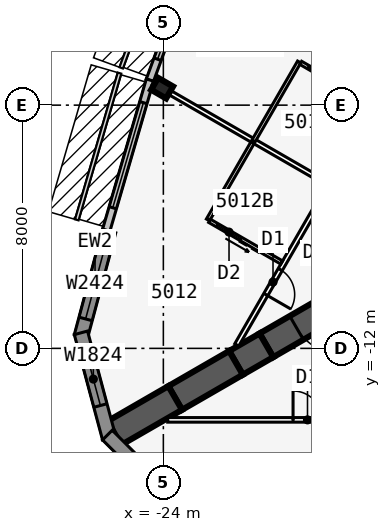
"""IFC4 building model, lengths in metres.
Left out: names, types, materials, properties, quantities, classifications, styles, units other than length and angle.
Written with IfcOpenShell. Run it as: python <this file> out.ifc"""

import sys

from ifc_helpers import new_model, si_unit, direction, frame, frame_2d, origin, origin_2d, place, context, subcontext, project, spatial, polyline, rectangle, i_section, outline, extrude, element, fill, save


model = new_model("IFC4")
c1 = context("Model", 3, precision=1e-05, world=origin(), true_north=direction((0.0, 1.0)))
c2 = subcontext(c1, "Body", "Model", "MODEL_VIEW")
j1 = project(units=[si_unit("LENGTHUNIT", "METRE"), si_unit("PLANEANGLEUNIT", "RADIAN")], contexts=[c1])
p1 = place(None, origin())
s1 = spatial("IfcSite", under=j1, at=p1, CompositionType="ELEMENT")
p2 = place(p1, origin())
s2 = spatial("IfcBuilding", under=s1, at=p2, CompositionType="ELEMENT")
p3 = place(p2, frame((0.0, 0.0, 186.1)))
s3 = spatial("IfcBuildingStorey", under=s2, at=p3, CompositionType="ELEMENT", Elevation=186.1)
p4 = place(p3, frame((-16.5, -9.526, 0.0), z_axis=(0.0, 0.0, 1.0), x_axis=(-0.866031398331, -0.499989616998, 0.0)))
e1 = element("IfcWall", 1, at=p4, inside=s3, PredefinedType="SHEAR", context=c2, shape_type="SweptSolid", body=[
    extrude(rectangle(XDim=4.746, YDim=0.9, at=frame_2d((2.373, 0.0))), origin(), (0.0, 0.0, 1.0), 3.4),
])
p5 = place(p4, frame((1.8, 0.0, 0.0)))
e2 = element("IfcOpeningElement", 2, at=p5, cuts=e1, PredefinedType="OPENING", context=c2, shape_type="SweptSolid", body=[
    extrude(rectangle(XDim=1.8, YDim=2.13, at=frame_2d((0.9, 1.065))), frame((0.0, 0.46, 0.0), z_axis=(0.0, -1.0, 0.0), x_axis=(1.0, 0.0, 0.0)), (0.0, 0.0, 1.0), 0.92),
])
p6 = place(p3, frame((-20.61, -11.899, 0.0), z_axis=(0.0, 0.0, 1.0), x_axis=(-0.866009537788, -0.500027479704, 0.0)))
e3 = element("IfcWall", 3, at=p6, inside=s3, PredefinedType="SHEAR", context=c2, shape_type="SweptSolid", body=[
    extrude(rectangle(XDim=1.155, YDim=0.9, at=frame_2d((0.577, 0.0))), origin(), (0.0, 0.0, 1.0), 3.4),
])
for number, where, z_axis, x_axis in (
    (4, (-21.61, -12.477, 0.0), (0.0, 0.0, 1.0), (-0.866, -0.5, 0.0)),
    (5, (-23.61, -13.631, 0.0), (0.0, 0.0, 1.0), (-0.866, -0.5, 0.0)),
):
    element("IfcWall", number, at=place(p3, frame(where, z_axis=z_axis, x_axis=x_axis)), inside=s3, PredefinedType="SHEAR", context=c2, shape_type="SweptSolid", body=[
        extrude(rectangle(XDim=2.309, YDim=0.9, at=frame_2d((1.155, 0.0))), origin(), (0.0, 0.0, 1.0), 3.4),
    ])
p7 = place(p3, frame((-24.041, -3.44, 0.0), z_axis=(0.0, 0.0, 1.0), x_axis=(-0.5, -0.866025403784, 0.0)))
e6 = element("IfcColumn", 6, at=p7, inside=s3, PredefinedType="COLUMN", context=c2, shape_type="SweptSolid", body=[
    extrude(i_section(OverallWidth=0.455, OverallDepth=0.569, WebThickness=0.078, FlangeThickness=0.125, at=origin_2d()), origin(), (0.0, 0.0, 1.0), 3.4),
])
p8 = place(p3, frame((-22.701, 1.584, 0.0), z_axis=(0.0, 0.0, 1.0), x_axis=(-0.343225593282, -0.939252996863, 0.0)))
e7 = element("IfcWall", 7, at=p8, inside=s3, PredefinedType="STANDARD", context=c2, shape_type="SweptSolid", body=[
    extrude(rectangle(XDim=5.076, YDim=0.25, at=frame_2d((2.538, 0.0))), origin(), (0.0, 0.0, 1.0), 3.15),
])
p9 = place(p8, frame((0.738, 0.0, 0.45)))
e8 = element("IfcOpeningElement", 8, at=p9, cuts=e7, PredefinedType="OPENING", context=c2, shape_type="SweptSolid", body=[
    extrude(rectangle(XDim=3.6, YDim=2.4, at=frame_2d((1.8, 1.2))), frame((0.0, 0.135, 0.0), z_axis=(0.0, -1.0, 0.0), x_axis=(1.0, 0.0, 0.0)), (0.0, 0.0, 1.0), 0.27),
])
p10 = place(p3, frame((-24.441, -3.175, 0.0), z_axis=(0.0, 0.0, 1.0), x_axis=(-0.279528287117, -0.960137457191, 0.0)))
e9 = element("IfcWall", 9, at=p10, inside=s3, PredefinedType="STANDARD", context=c2, shape_type="SweptSolid", body=[
    extrude(rectangle(XDim=5.148, YDim=0.25, at=frame_2d((2.574, 0.0))), origin(), (0.0, 0.0, 1.0), 3.15),
])
p11 = place(p10, frame((0.774, 0.0, 0.45)))
e10 = element("IfcOpeningElement", 10, at=p11, cuts=e9, PredefinedType="OPENING", context=c2, shape_type="SweptSolid", body=[
    extrude(rectangle(XDim=3.6, YDim=2.4, at=frame_2d((1.8, 1.2))), frame((0.0, 0.135, 0.0), z_axis=(0.0, -1.0, 0.0), x_axis=(1.0, 0.0, 0.0)), (0.0, 0.0, 1.0), 0.27),
])
p12 = place(p3, frame((-25.783, -8.141, 0.0), z_axis=(0.0, 0.0, 1.0), x_axis=(-0.258823421857, -0.965924653531, 0.0)))
e11 = element("IfcWall", 11, at=p12, inside=s3, PredefinedType="SOLIDWALL", context=c2, shape_type="SweptSolid", body=[
    extrude(rectangle(XDim=3.586, YDim=0.45, at=frame_2d((1.793, 0.0))), origin(), (0.0, 0.0, 1.0), 3.15),
])
p13 = place(p12, frame((0.593, 0.0, 0.45)))
e12 = element("IfcOpeningElement", 12, at=p13, cuts=e11, PredefinedType="OPENING", context=c2, shape_type="SweptSolid", body=[
    extrude(rectangle(XDim=2.4, YDim=2.4, at=frame_2d((1.2, 1.2))), frame((0.0, 0.235, 0.0), z_axis=(0.0, -1.0, 0.0), x_axis=(1.0, 0.0, 0.0)), (0.0, 0.0, 1.0), 0.47),
])
p14 = place(p3, frame((-26.711, -11.489, 0.0), z_axis=(0.0, 0.0, 1.0), x_axis=(0.258823421857, -0.965924653531, 0.0)))
e13 = element("IfcWall", 13, at=p14, inside=s3, PredefinedType="SOLIDWALL", context=c2, shape_type="SweptSolid", body=[
    extrude(outline(polyline([(3.586, 0.225), (3.527, 0.225), (3.035, 0.093), (3.0, 0.225), (0.0, 0.225), (0.0, -0.225), (3.586, -0.225), (3.586, 0.225)])), origin(), (0.0, 0.0, 1.0), 3.15),
])
p15 = place(p14, frame((0.675, 0.0, 0.45)))
e14 = element("IfcOpeningElement", 14, at=p15, cuts=e13, PredefinedType="OPENING", context=c2, shape_type="SweptSolid", body=[
    extrude(rectangle(XDim=1.8, YDim=2.4, at=frame_2d((0.9, 1.2))), frame((0.0, 0.235, 0.0), z_axis=(0.0, -1.0, 0.0), x_axis=(1.0, 0.0, 0.0)), (0.0, 0.0, 1.0), 0.47),
])
p16 = place(p3, frame((-25.841, -14.852, 0.0), z_axis=(0.0, 0.0, 1.0), x_axis=(0.707106781187, -0.707106781187, 0.0)))
e15 = element("IfcWall", 15, at=p16, inside=s3, PredefinedType="SOLIDWALL", context=c2, shape_type="SweptSolid", body=[
    extrude(outline(polyline([(3.586, 0.225), (0.586, 0.225), (0.551, 0.093), (0.059, 0.225), (0.0, 0.225), (0.0, -0.225), (3.586, -0.225), (3.586, 0.225)])), origin(), (0.0, 0.0, 1.0), 3.15),
])
p17 = place(p16, frame((1.111, 0.0, 0.45)))
e16 = element("IfcOpeningElement", 16, at=p17, cuts=e15, PredefinedType="OPENING", context=c2, shape_type="SweptSolid", body=[
    extrude(rectangle(XDim=1.8, YDim=2.4, at=frame_2d((0.9, 1.2))), frame((0.0, 0.235, 0.0), z_axis=(0.0, -1.0, 0.0), x_axis=(1.0, 0.0, 0.0)), (0.0, 0.0, 1.0), 0.47),
])
p18 = place(p3, frame((-23.857, -14.351, 0.0), z_axis=(0.0, 0.0, 1.0), x_axis=(1.0, 0.0, 0.0)))
e17 = element("IfcWall", 17, at=p18, inside=s3, PredefinedType="PARTITIONING", context=c2, shape_type="SweptSolid", body=[
    extrude(rectangle(XDim=47.714, YDim=0.15, at=frame_2d((23.857, 0.0))), origin(), (0.0, 0.0, 1.0), 3.15),
])
p19 = place(p18, frame((4.123, 0.0, 0.0)))
e18 = element("IfcOpeningElement", 18, at=p19, cuts=e17, PredefinedType="OPENING", context=c2, shape_type="SweptSolid", body=[
    extrude(rectangle(XDim=0.95, YDim=2.13, at=frame_2d((0.475, 1.065))), frame((0.0, 0.085, 0.0), z_axis=(0.0, -1.0, 0.0), x_axis=(1.0, 0.0, 0.0)), (0.0, 0.0, 1.0), 0.17),
])
p20 = place(p18, frame((17.082, 0.0, 0.0)))
e19 = element("IfcOpeningElement", 19, at=p20, cuts=e17, PredefinedType="OPENING", context=c2, shape_type="SweptSolid", body=[
    extrude(rectangle(XDim=0.95, YDim=2.13, at=frame_2d((0.475, 1.065))), frame((0.0, 0.085, 0.0), z_axis=(0.0, -1.0, 0.0), x_axis=(1.0, 0.0, 0.0)), (0.0, 0.0, 1.0), 0.17),
])
p21 = place(p18, frame((25.857, 0.0, 0.0)))
e20 = element("IfcOpeningElement", 20, at=p21, cuts=e17, PredefinedType="OPENING", context=c2, shape_type="SweptSolid", body=[
    extrude(rectangle(XDim=1.0, YDim=2.13, at=frame_2d((0.5, 1.065))), frame((0.0, 0.085, 0.0), z_axis=(0.0, -1.0, 0.0), x_axis=(1.0, 0.0, 0.0)), (0.0, 0.0, 1.0), 0.17),
])
p22 = place(p18, frame((30.882, 0.0, 0.0)))
e21 = element("IfcOpeningElement", 21, at=p22, cuts=e17, PredefinedType="OPENING", context=c2, shape_type="SweptSolid", body=[
    extrude(rectangle(XDim=0.95, YDim=2.13, at=frame_2d((0.475, 1.065))), frame((0.0, 0.085, 0.0), z_axis=(0.0, -1.0, 0.0), x_axis=(1.0, 0.0, 0.0)), (0.0, 0.0, 1.0), 0.17),
])
p23 = place(p18, frame((42.082, 0.0, 0.0)))
e22 = element("IfcOpeningElement", 22, at=p23, cuts=e17, PredefinedType="OPENING", context=c2, shape_type="SweptSolid", body=[
    extrude(rectangle(XDim=0.95, YDim=2.13, at=frame_2d((0.475, 1.065))), frame((0.0, 0.085, 0.0), z_axis=(0.0, -1.0, 0.0), x_axis=(1.0, 0.0, 0.0)), (0.0, 0.0, 1.0), 0.17),
])
p24 = place(p3, frame((-0.5, 24.636, 0.0), z_axis=(0.0, 0.0, 1.0), x_axis=(-0.500001915564, -0.86602429783, 0.0)))
e23 = element("IfcWall", 23, at=p24, inside=s3, PredefinedType="PARTITIONING", context=c2, shape_type="SweptSolid", body=[
    extrude(rectangle(XDim=42.172, YDim=0.15, at=frame_2d((21.086, 0.0))), origin(), (0.0, 0.0, 1.0), 3.15),
])
p25 = place(p24, frame((2.338, 0.0, 0.0)))
e24 = element("IfcOpeningElement", 24, at=p25, cuts=e23, PredefinedType="OPENING", context=c2, shape_type="SweptSolid", body=[
    extrude(rectangle(XDim=0.95, YDim=2.13, at=frame_2d((0.475, 1.065))), frame((0.0, 0.085, 0.0), z_axis=(0.0, -1.0, 0.0), x_axis=(1.0, 0.0, 0.0)), (0.0, 0.0, 1.0), 0.17),
])
p26 = place(p24, frame((18.111, 0.0, 0.0)))
e25 = element("IfcOpeningElement", 25, at=p26, cuts=e23, PredefinedType="OPENING", context=c2, shape_type="SweptSolid", body=[
    extrude(rectangle(XDim=0.95, YDim=2.13, at=frame_2d((0.475, 1.065))), frame((0.0, 0.085, 0.0), z_axis=(0.0, -1.0, 0.0), x_axis=(1.0, 0.0, 0.0)), (0.0, 0.0, 1.0), 0.17),
])
p27 = place(p24, frame((28.111, 0.0, 0.0)))
e26 = element("IfcOpeningElement", 26, at=p27, cuts=e23, PredefinedType="OPENING", context=c2, shape_type="SweptSolid", body=[
    extrude(rectangle(XDim=0.95, YDim=2.13, at=frame_2d((0.475, 1.065))), frame((0.0, 0.085, 0.0), z_axis=(0.0, -1.0, 0.0), x_axis=(1.0, 0.0, 0.0)), (0.0, 0.0, 1.0), 0.17),
])
p28 = place(p24, frame((39.311, 0.0, 0.0)))
e27 = element("IfcOpeningElement", 27, at=p28, cuts=e23, PredefinedType="OPENING", context=c2, shape_type="SweptSolid", body=[
    extrude(rectangle(XDim=0.95, YDim=2.13, at=frame_2d((0.475, 1.065))), frame((0.0, 0.085, 0.0), z_axis=(0.0, -1.0, 0.0), x_axis=(1.0, 0.0, 0.0)), (0.0, 0.0, 1.0), 0.17),
])
p29 = place(p3, frame((-16.108, -2.247, 0.0), z_axis=(0.0, 0.0, 1.0), x_axis=(-0.866025567496, 0.499999716443, 0.0)))
e28 = element("IfcWall", 28, at=p29, inside=s3, PredefinedType="PARTITIONING", context=c2, shape_type="SweptSolid", body=[
    extrude(rectangle(XDim=7.495, YDim=0.1, at=frame_2d((3.748, 0.0))), origin(), (0.0, 0.0, 1.0), 2.108),
])
p30 = place(p29, frame((0.45, 0.0, 0.0)))
e29 = element("IfcOpeningElement", 29, at=p30, cuts=e28, PredefinedType="OPENING", context=c2, shape_type="SweptSolid", body=[
    extrude(rectangle(XDim=0.9, YDim=2.032, at=frame_2d((0.45, 1.016))), frame((0.0, 0.06, 0.0), z_axis=(0.0, -1.0, 0.0), x_axis=(1.0, 0.0, 0.0)), (0.0, 0.0, 1.0), 0.12),
])
p31 = place(p3, frame((-18.608, -6.577, 0.0), z_axis=(0.0, 0.0, 1.0), x_axis=(-0.866031967744, 0.499988630717, 0.0)))
e30 = element("IfcWall", 30, at=p31, inside=s3, PredefinedType="PARTITIONING", context=c2, shape_type="SweptSolid", body=[
    extrude(rectangle(XDim=6.616, YDim=0.15, at=frame_2d((3.308, 0.0))), origin(), (0.0, 0.0, 1.0), 2.05),
])
p32 = place(p3, frame((-19.533, -2.579, 0.0), z_axis=(0.0, 0.0, 1.0), x_axis=(-0.499990139034, -0.866031096941, 0.0)))
e31 = element("IfcWall", 31, at=p32, inside=s3, PredefinedType="PLUMBINGWALL", context=c2, shape_type="SweptSolid", body=[
    extrude(rectangle(XDim=3.0, YDim=0.12, at=frame_2d((1.5, 0.0))), origin(), (0.0, 0.0, 1.0), 3.15),
])
p33 = place(p3, frame((-17.108, -3.979, 0.0), z_axis=(0.0, 0.0, 1.0), x_axis=(-0.865997131366, 0.500048966069, 0.0)))
e32 = element("IfcWall", 32, at=p33, inside=s3, PredefinedType="PLUMBINGWALL", context=c2, shape_type="SweptSolid", body=[
    extrude(rectangle(XDim=2.74, YDim=0.12, at=frame_2d((1.37, 0.0))), origin(), (0.0, 0.0, 1.0), 3.15),
])
p34 = place(p33, frame((1.55, 0.0, 0.0)))
e33 = element("IfcOpeningElement", 33, at=p34, cuts=e32, PredefinedType="OPENING", context=c2, shape_type="SweptSolid", body=[
    extrude(rectangle(XDim=0.9, YDim=2.13, at=frame_2d((0.45, 1.065))), frame((0.0, 0.07, 0.0), z_axis=(0.0, -1.0, 0.0), x_axis=(1.0, 0.0, 0.0)), (0.0, 0.0, 1.0), 0.14),
])
p35 = place(p3, frame((-21.033, -5.177, 0.0), z_axis=(0.0, 0.0, 1.0), x_axis=(-0.499990139034, -0.866031096941, 0.0)))
e34 = element("IfcWall", 34, at=p35, inside=s3, PredefinedType="PLUMBINGWALL", context=c2, shape_type="SweptSolid", body=[
    extrude(rectangle(XDim=3.0, YDim=0.12, at=frame_2d((1.5, 0.0))), origin(), (0.0, 0.0, 1.0), 3.15),
])
p36 = place(p3, frame((-20.108, -9.175, 0.0), z_axis=(0.0, 0.0, 1.0), x_axis=(-0.866035715982, 0.499982138324, 0.0)))
e35 = element("IfcWall", 35, at=p36, inside=s3, PredefinedType="PLUMBINGWALL", context=c2, shape_type="SweptSolid", body=[
    extrude(rectangle(XDim=2.74, YDim=0.12, at=frame_2d((1.37, 0.0))), origin(), (0.0, 0.0, 1.0), 3.15),
])
p37 = place(p36, frame((1.55, 0.0, 0.0)))
e36 = element("IfcOpeningElement", 36, at=p37, cuts=e35, PredefinedType="OPENING", context=c2, shape_type="SweptSolid", body=[
    extrude(rectangle(XDim=0.9, YDim=2.13, at=frame_2d((0.45, 1.065))), frame((0.0, 0.07, 0.0), z_axis=(0.0, -1.0, 0.0), x_axis=(1.0, 0.0, 0.0)), (0.0, 0.0, 1.0), 0.14),
])
p38 = place(p9, origin())
e37 = element("IfcWindow", 37, at=p38, inside=s3, PartitioningType="SINGLE_PANEL", PredefinedType="WINDOW", context=c2, shape_type="SweptSolid", body=[
    extrude(rectangle(XDim=3.6, YDim=2.4, at=frame_2d((1.8, 1.2))), frame((0.0, 0.03, 0.0), z_axis=(0.0, -1.0, 0.0), x_axis=(1.0, 0.0, 0.0)), (0.0, 0.0, 1.0), 0.06),
])
fill(e8, e37)
p39 = place(p11, origin())
e38 = element("IfcWindow", 38, at=p39, inside=s3, PartitioningType="SINGLE_PANEL", PredefinedType="WINDOW", context=c2, shape_type="SweptSolid", body=[
    extrude(rectangle(XDim=3.6, YDim=2.4, at=frame_2d((1.8, 1.2))), frame((0.0, 0.03, 0.0), z_axis=(0.0, -1.0, 0.0), x_axis=(1.0, 0.0, 0.0)), (0.0, 0.0, 1.0), 0.06),
])
fill(e10, e38)
p40 = place(p13, origin())
e39 = element("IfcWindow", 39, at=p40, inside=s3, PartitioningType="SINGLE_PANEL", PredefinedType="WINDOW", context=c2, shape_type="SweptSolid", body=[
    extrude(rectangle(XDim=2.4, YDim=2.4, at=frame_2d((1.2, 1.2))), frame((0.0, 0.03, 0.0), z_axis=(0.0, -1.0, 0.0), x_axis=(1.0, 0.0, 0.0)), (0.0, 0.0, 1.0), 0.06),
])
fill(e12, e39)
p41 = place(p15, origin())
e40 = element("IfcWindow", 40, at=p41, inside=s3, PartitioningType="SINGLE_PANEL", PredefinedType="WINDOW", context=c2, shape_type="SweptSolid", body=[
    extrude(rectangle(XDim=1.8, YDim=2.4, at=frame_2d((0.9, 1.2))), frame((0.0, 0.03, 0.0), z_axis=(0.0, -1.0, 0.0), x_axis=(1.0, 0.0, 0.0)), (0.0, 0.0, 1.0), 0.06),
])
fill(e14, e40)
p42 = place(p19, origin())
e41 = element("IfcDoor", 41, at=p42, inside=s3, OperationType="SINGLE_SWING_LEFT", PredefinedType="DOOR", context=c2, shape_type="SweptSolid", body=[
    extrude(rectangle(XDim=0.95, YDim=2.13, at=frame_2d((0.475, 1.065))), frame((0.0, 0.025, 0.0), z_axis=(0.0, -1.0, 0.0), x_axis=(1.0, 0.0, 0.0)), (0.0, 0.0, 1.0), 0.05),
])
fill(e18, e41)
p43 = place(p34, origin())
e42 = element("IfcDoor", 42, at=p43, inside=s3, OperationType="SLIDING_TO_LEFT", PredefinedType="DOOR", context=c2, shape_type="SweptSolid", body=[
    extrude(rectangle(XDim=0.9, YDim=2.13, at=frame_2d((0.45, 1.065))), frame((0.0, 0.025, 0.0), z_axis=(0.0, -1.0, 0.0), x_axis=(1.0, 0.0, 0.0)), (0.0, 0.0, 1.0), 0.05),
])
fill(e33, e42)
p44 = place(p37, origin())
e43 = element("IfcDoor", 43, at=p44, inside=s3, OperationType="SLIDING_TO_LEFT", PredefinedType="DOOR", context=c2, shape_type="SweptSolid", body=[
    extrude(rectangle(XDim=0.9, YDim=2.13, at=frame_2d((0.45, 1.065))), frame((0.0, 0.025, 0.0), z_axis=(0.0, -1.0, 0.0), x_axis=(1.0, 0.0, 0.0)), (0.0, 0.0, 1.0), 0.05),
])
fill(e36, e43)
p45 = place(p28, origin())
e44 = element("IfcDoor", 44, at=p45, inside=s3, OperationType="SINGLE_SWING_RIGHT", PredefinedType="DOOR", context=c2, shape_type="SweptSolid", body=[
    extrude(rectangle(XDim=0.95, YDim=2.13, at=frame_2d((0.475, 1.065))), frame((0.0, 0.025, 0.0), z_axis=(0.0, -1.0, 0.0), x_axis=(1.0, 0.0, 0.0)), (0.0, 0.0, 1.0), 0.05),
])
fill(e27, e44)
p46 = place(p5, origin())
e45 = element("IfcDoor", 45, at=p46, inside=s3, OperationType="DOUBLE_DOOR_DOUBLE_SWING", PredefinedType="DOOR", context=c2, shape_type="SweptSolid", body=[
    extrude(rectangle(XDim=1.8, YDim=2.13, at=frame_2d((0.9, 1.065))), frame((0.0, 0.025, 0.0), z_axis=(0.0, -1.0, 0.0), x_axis=(1.0, 0.0, 0.0)), (0.0, 0.0, 1.0), 0.05),
])
fill(e2, e45)
save(model, sys.argv[1])
